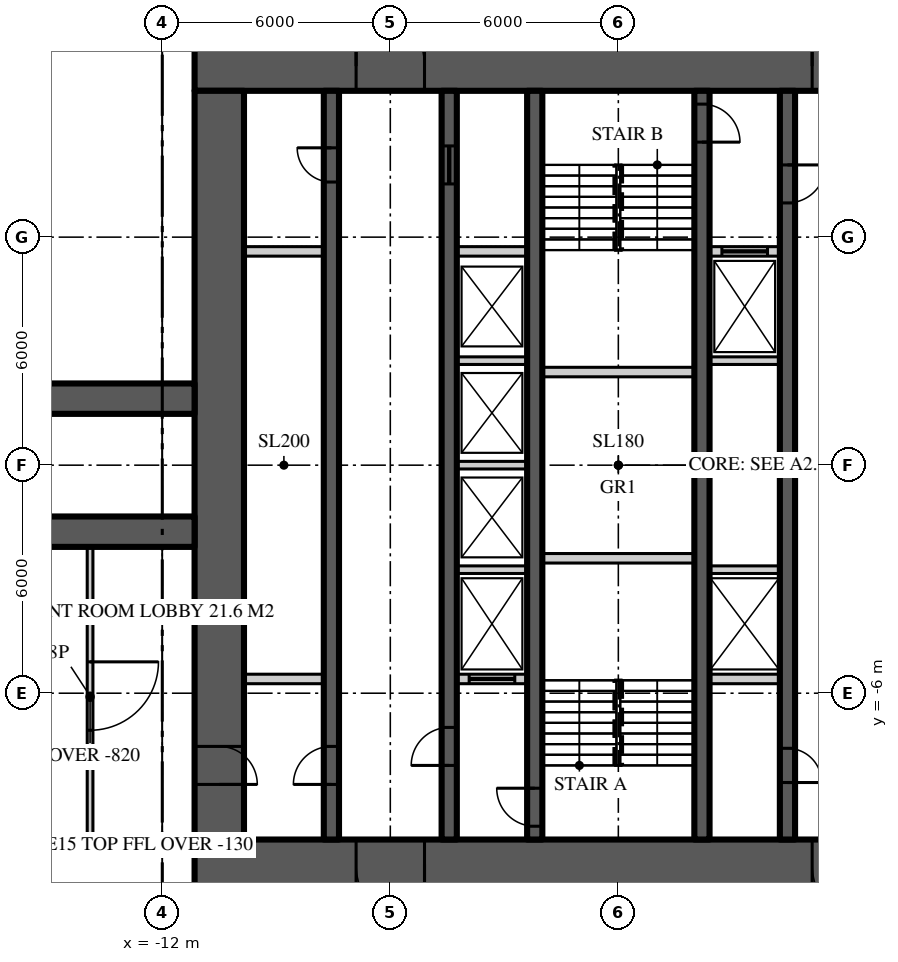
"""IFC4 building model, lengths in metres.
Left out: names, types, materials, properties, quantities, classifications, styles, units other than length and angle.
Written with IfcOpenShell. Run it as: python <this file> out.ifc"""

import sys

from ifc_helpers import new_model, si_unit, direction, frame, frame_2d, origin, place, context, subcontext, project, spatial, rectangle, extrude, element, fill, save


model = new_model("IFC4")
c1 = context("Model", 3, precision=1e-05, world=origin(), true_north=direction((0.0, 1.0)))
c2 = subcontext(c1, "Body", "Model", "MODEL_VIEW")
j1 = project(units=[si_unit("LENGTHUNIT", "METRE"), si_unit("PLANEANGLEUNIT", "RADIAN")], contexts=[c1])
p1 = place(None, origin())
s1 = spatial("IfcSite", under=j1, at=p1, CompositionType="ELEMENT")
p2 = place(p1, origin())
s2 = spatial("IfcBuilding", under=s1, at=p2, CompositionType="ELEMENT")
p3 = place(p2, frame((0.0, 0.0, 118.2)))
s3 = spatial("IfcBuildingStorey", under=s2, at=p3, CompositionType="ELEMENT", Elevation=118.2)
p4 = place(p3, frame((-11.15, 10.5, 0.0), z_axis=(0.0, 0.0, 1.0), x_axis=(1.0, 0.0, 0.0)))
e1 = element("IfcWall", 1, at=p4, inside=s3, PredefinedType="SHEAR", context=c2, shape_type="SweptSolid", body=[
    extrude(rectangle(XDim=22.3, YDim=1.3, at=frame_2d((11.15, 0.0))), origin(), (0.0, 0.0, 1.0), 6.0),
])
p5 = place(p4, frame((4.25, 0.0, 0.0)))
e2 = element("IfcOpeningElement", 2, at=p5, cuts=e1, PredefinedType="OPENING", context=c2, shape_type="SweptSolid", body=[
    extrude(rectangle(XDim=1.8, YDim=2.2, at=frame_2d((0.9, 1.1))), frame((0.0, 0.66, 0.0), z_axis=(0.0, -1.0, 0.0), x_axis=(1.0, 0.0, 0.0)), (0.0, 0.0, 1.0), 1.32),
])
p6 = place(p4, frame((16.25, 0.0, 0.0)))
e3 = element("IfcOpeningElement", 3, at=p6, cuts=e1, PredefinedType="OPENING", context=c2, shape_type="SweptSolid", body=[
    extrude(rectangle(XDim=1.8, YDim=2.2, at=frame_2d((0.9, 1.1))), frame((0.0, 0.66, 0.0), z_axis=(0.0, -1.0, 0.0), x_axis=(1.0, 0.0, 0.0)), (0.0, 0.0, 1.0), 1.32),
])
p7 = place(p3, frame((11.15, -10.5, 0.0), z_axis=(0.0, 0.0, 1.0), x_axis=(-1.0, 0.0, 0.0)))
e4 = element("IfcWall", 4, at=p7, inside=s3, PredefinedType="SHEAR", context=c2, shape_type="SweptSolid", body=[
    extrude(rectangle(XDim=22.3, YDim=1.3, at=frame_2d((11.15, 0.0))), origin(), (0.0, 0.0, 1.0), 6.0),
])
p8 = place(p7, frame((16.25, 0.0, 0.0)))
e5 = element("IfcOpeningElement", 5, at=p8, cuts=e4, PredefinedType="OPENING", context=c2, shape_type="SweptSolid", body=[
    extrude(rectangle(XDim=1.8, YDim=2.2, at=frame_2d((0.9, 1.1))), frame((0.0, 0.66, 0.0), z_axis=(0.0, -1.0, 0.0), x_axis=(1.0, 0.0, 0.0)), (0.0, 0.0, 1.0), 1.32),
])
p9 = place(p7, frame((4.25, 0.0, 0.0)))
e6 = element("IfcOpeningElement", 6, at=p9, cuts=e4, PredefinedType="OPENING", context=c2, shape_type="SweptSolid", body=[
    extrude(rectangle(XDim=1.8, YDim=2.2, at=frame_2d((0.9, 1.1))), frame((0.0, 0.66, 0.0), z_axis=(0.0, -1.0, 0.0), x_axis=(1.0, 0.0, 0.0)), (0.0, 0.0, 1.0), 1.32),
])
p10 = place(p3, frame((-10.5, 9.85, 0.0), z_axis=(0.0, 0.0, 1.0), x_axis=(0.0, -1.0, 0.0)))
e7 = element("IfcWall", 7, at=p10, inside=s3, PredefinedType="SHEAR", context=c2, shape_type="SweptSolid", body=[
    extrude(rectangle(XDim=19.7, YDim=1.3, at=frame_2d((9.85, 0.0))), origin(), (0.0, 0.0, 1.0), 6.0),
])
p11 = place(p10, frame((17.25, 0.0, 0.0)))
e8 = element("IfcOpeningElement", 8, at=p11, cuts=e7, PredefinedType="OPENING", context=c2, shape_type="SweptSolid", body=[
    extrude(rectangle(XDim=1.0, YDim=2.2, at=frame_2d((0.5, 1.1))), frame((0.0, 0.66, 0.0), z_axis=(0.0, -1.0, 0.0), x_axis=(1.0, 0.0, 0.0)), (0.0, 0.0, 1.0), 1.32),
])
for number, where, z_axis, x_axis in (
    (9, (-11.15, 1.75, 0.0), (0.0, 0.0, 1.0), (-1.0, 0.0, 0.0)),
    (10, (-11.15, -1.75, 0.0), (0.0, 0.0, 1.0), (-1.0, 0.0, 0.0)),
):
    element("IfcWall", number, at=place(p3, frame(where, z_axis=z_axis, x_axis=x_axis)), inside=s3, PredefinedType="SHEAR", context=c2, shape_type="SweptSolid", body=[
        extrude(rectangle(XDim=15.25, YDim=0.8, at=frame_2d((7.625, 0.0))), origin(), (0.0, 0.0, 1.0), 6.0),
    ])
p12 = place(p3, frame((-7.55, -9.85, 0.0), z_axis=(0.0, 0.0, 1.0), x_axis=(0.0, 1.0, 0.0)))
e11 = element("IfcWall", 11, at=p12, inside=s3, PredefinedType="SHEAR", context=c2, shape_type="SweptSolid", body=[
    extrude(rectangle(XDim=19.7, YDim=0.4, at=frame_2d((9.85, 0.0))), origin(), (0.0, 0.0, 1.0), 6.0),
])
p13 = place(p12, frame((1.45, 0.0, 0.0)))
e12 = element("IfcOpeningElement", 12, at=p13, cuts=e11, PredefinedType="OPENING", context=c2, shape_type="SweptSolid", body=[
    extrude(rectangle(XDim=1.0, YDim=2.2, at=frame_2d((0.5, 1.1))), frame((0.0, 0.21, 0.0), z_axis=(0.0, -1.0, 0.0), x_axis=(1.0, 0.0, 0.0)), (0.0, 0.0, 1.0), 0.42),
])
p14 = place(p12, frame((17.3, 0.0, 0.0)))
e13 = element("IfcOpeningElement", 13, at=p14, cuts=e11, PredefinedType="OPENING", context=c2, shape_type="SweptSolid", body=[
    extrude(rectangle(XDim=0.9, YDim=2.1, at=frame_2d((0.45, 1.05))), frame((0.0, 0.21, 0.0), z_axis=(0.0, -1.0, 0.0), x_axis=(1.0, 0.0, 0.0)), (0.0, 0.0, 1.0), 0.42),
])
p15 = place(p3, frame((-4.45, -9.85, 0.0), z_axis=(0.0, 0.0, 1.0), x_axis=(0.0, 1.0, 0.0)))
e14 = element("IfcWall", 14, at=p15, inside=s3, PredefinedType="SHEAR", context=c2, shape_type="SweptSolid", body=[
    extrude(rectangle(XDim=19.7, YDim=0.4, at=frame_2d((9.85, 0.0))), origin(), (0.0, 0.0, 1.0), 6.0),
])
p16 = place(p15, frame((1.95, 0.0, 0.0)))
e15 = element("IfcOpeningElement", 15, at=p16, cuts=e14, PredefinedType="OPENING", context=c2, shape_type="SweptSolid", body=[
    extrude(rectangle(XDim=1.0, YDim=2.2, at=frame_2d((0.5, 1.1))), frame((0.0, 0.21, 0.0), z_axis=(0.0, -1.0, 0.0), x_axis=(1.0, 0.0, 0.0)), (0.0, 0.0, 1.0), 0.42),
])
p17 = place(p15, frame((17.25, 0.0, 0.0)))
e16 = element("IfcOpeningElement", 16, at=p17, cuts=e14, PredefinedType="OPENING", context=c2, shape_type="SweptSolid", body=[
    extrude(rectangle(XDim=1.0, YDim=2.1, at=frame_2d((0.5, 1.05))), frame((0.0, 0.21, 0.0), z_axis=(0.0, -1.0, 0.0), x_axis=(1.0, 0.0, 0.0)), (0.0, 0.0, 1.0), 0.42),
])
p18 = place(p3, frame((4.45, 9.85, 0.0), z_axis=(0.0, 0.0, 1.0), x_axis=(0.0, -1.0, 0.0)))
e17 = element("IfcWall", 17, at=p18, inside=s3, PredefinedType="SHEAR", context=c2, shape_type="SweptSolid", body=[
    extrude(rectangle(XDim=19.7, YDim=0.4, at=frame_2d((9.85, 0.0))), origin(), (0.0, 0.0, 1.0), 6.0),
])
p19 = place(p18, frame((1.95, 0.0, 0.0)))
e18 = element("IfcOpeningElement", 18, at=p19, cuts=e17, PredefinedType="OPENING", context=c2, shape_type="SweptSolid", body=[
    extrude(rectangle(XDim=1.0, YDim=2.2, at=frame_2d((0.5, 1.1))), frame((0.0, 0.21, 0.0), z_axis=(0.0, -1.0, 0.0), x_axis=(1.0, 0.0, 0.0)), (0.0, 0.0, 1.0), 0.42),
])
p20 = place(p18, frame((17.3, 0.0, 0.0)))
e19 = element("IfcOpeningElement", 19, at=p20, cuts=e17, PredefinedType="OPENING", context=c2, shape_type="SweptSolid", body=[
    extrude(rectangle(XDim=0.9, YDim=2.1, at=frame_2d((0.45, 1.05))), frame((0.0, 0.21, 0.0), z_axis=(0.0, -1.0, 0.0), x_axis=(1.0, 0.0, 0.0)), (0.0, 0.0, 1.0), 0.42),
])
p21 = place(p3, frame((-2.2, -9.85, 0.0), z_axis=(0.0, 0.0, 1.0), x_axis=(0.0, 1.0, 0.0)))
e20 = element("IfcWall", 20, at=p21, inside=s3, PredefinedType="SHEAR", context=c2, shape_type="SweptSolid", body=[
    extrude(rectangle(XDim=19.7, YDim=0.4, at=frame_2d((9.85, 0.0))), origin(), (0.0, 0.0, 1.0), 6.0),
])
p22 = place(p21, frame((0.35, 0.0, 0.0)))
e21 = element("IfcOpeningElement", 21, at=p22, cuts=e20, PredefinedType="OPENING", context=c2, shape_type="SweptSolid", body=[
    extrude(rectangle(XDim=1.0, YDim=2.2, at=frame_2d((0.5, 1.1))), frame((0.0, 0.21, 0.0), z_axis=(0.0, -1.0, 0.0), x_axis=(1.0, 0.0, 0.0)), (0.0, 0.0, 1.0), 0.42),
])
p23 = place(p3, frame((2.2, 9.85, 0.0), z_axis=(0.0, 0.0, 1.0), x_axis=(0.0, -1.0, 0.0)))
e22 = element("IfcWall", 22, at=p23, inside=s3, PredefinedType="SHEAR", context=c2, shape_type="SweptSolid", body=[
    extrude(rectangle(XDim=19.7, YDim=0.4, at=frame_2d((9.85, 0.0))), origin(), (0.0, 0.0, 1.0), 6.0),
])
p24 = place(p23, frame((0.35, 0.0, 0.0)))
e23 = element("IfcOpeningElement", 23, at=p24, cuts=e22, PredefinedType="OPENING", context=c2, shape_type="SweptSolid", body=[
    extrude(rectangle(XDim=1.0, YDim=2.2, at=frame_2d((0.5, 1.1))), frame((0.0, 0.21, 0.0), z_axis=(0.0, -1.0, 0.0), x_axis=(1.0, 0.0, 0.0)), (0.0, 0.0, 1.0), 0.42),
])
p25 = place(p3, frame((-9.85, 5.625, 0.0), z_axis=(0.0, 0.0, 1.0), x_axis=(1.0, 0.0, 0.0)))
e24 = element("IfcWall", 24, at=p25, inside=s3, PredefinedType="SOLIDWALL", context=c2, shape_type="SweptSolid", body=[
    extrude(rectangle(XDim=2.1, YDim=0.25, at=frame_2d((1.05, 0.0))), origin(), (0.0, 0.0, 1.0), 5.8),
])
p26 = place(p3, frame((-4.25, 5.625, 0.0), z_axis=(0.0, 0.0, 1.0), x_axis=(1.0, 0.0, 0.0)))
e25 = element("IfcWall", 25, at=p26, inside=s3, PredefinedType="SOLIDWALL", context=c2, shape_type="SweptSolid", body=[
    extrude(rectangle(XDim=1.85, YDim=0.25, at=frame_2d((0.925, 0.0))), origin(), (0.0, 0.0, 1.0), 5.8),
])
p27 = place(p3, frame((2.4, 5.625, 0.0), z_axis=(0.0, 0.0, 1.0), x_axis=(1.0, 0.0, 0.0)))
e26 = element("IfcWall", 26, at=p27, inside=s3, PredefinedType="SOLIDWALL", context=c2, shape_type="SweptSolid", body=[
    extrude(rectangle(XDim=1.85, YDim=0.25, at=frame_2d((0.925, 0.0))), origin(), (0.0, 0.0, 1.0), 5.8),
])
p28 = place(p27, frame((0.325, 0.0, 0.0)))
e27 = element("IfcOpeningElement", 27, at=p28, cuts=e26, PredefinedType="OPENING", context=c2, shape_type="SweptSolid", body=[
    extrude(rectangle(XDim=1.2, YDim=2.2, at=frame_2d((0.6, 1.1))), frame((0.0, 0.135, 0.0), z_axis=(0.0, -1.0, 0.0), x_axis=(1.0, 0.0, 0.0)), (0.0, 0.0, 1.0), 0.27),
])
p29 = place(p3, frame((-9.85, -5.625, 0.0), z_axis=(0.0, 0.0, 1.0), x_axis=(1.0, 0.0, 0.0)))
e28 = element("IfcWall", 28, at=p29, inside=s3, PredefinedType="SOLIDWALL", context=c2, shape_type="SweptSolid", body=[
    extrude(rectangle(XDim=2.1, YDim=0.25, at=frame_2d((1.05, 0.0))), origin(), (0.0, 0.0, 1.0), 5.8),
])
p30 = place(p3, frame((-4.25, -5.625, 0.0), z_axis=(0.0, 0.0, 1.0), x_axis=(1.0, 0.0, 0.0)))
e29 = element("IfcWall", 29, at=p30, inside=s3, PredefinedType="SOLIDWALL", context=c2, shape_type="SweptSolid", body=[
    extrude(rectangle(XDim=1.85, YDim=0.25, at=frame_2d((0.925, 0.0))), origin(), (0.0, 0.0, 1.0), 5.8),
])
p31 = place(p30, frame((0.325, 0.0, 0.0)))
e30 = element("IfcOpeningElement", 30, at=p31, cuts=e29, PredefinedType="OPENING", context=c2, shape_type="SweptSolid", body=[
    extrude(rectangle(XDim=1.2, YDim=2.2, at=frame_2d((0.6, 1.1))), frame((0.0, 0.135, 0.0), z_axis=(0.0, -1.0, 0.0), x_axis=(1.0, 0.0, 0.0)), (0.0, 0.0, 1.0), 0.27),
])
p32 = place(p3, frame((2.4, -5.625, 0.0), z_axis=(0.0, 0.0, 1.0), x_axis=(1.0, 0.0, 0.0)))
e31 = element("IfcWall", 31, at=p32, inside=s3, PredefinedType="SOLIDWALL", context=c2, shape_type="SweptSolid", body=[
    extrude(rectangle(XDim=1.85, YDim=0.25, at=frame_2d((0.925, 0.0))), origin(), (0.0, 0.0, 1.0), 5.8),
])
for number, where, z_axis, x_axis in (
    (32, (-2.0, -2.45, 0.0), (0.0, 0.0, 1.0), (1.0, 0.0, 0.0)),
    (33, (-2.0, 2.45, 0.0), (0.0, 0.0, 1.0), (1.0, 0.0, 0.0)),
):
    element("IfcWall", number, at=place(p3, frame(where, z_axis=z_axis, x_axis=x_axis)), inside=s3, PredefinedType="SOLIDWALL", context=c2, shape_type="SweptSolid", body=[
        extrude(rectangle(XDim=4.0, YDim=0.25, at=frame_2d((2.0, 0.0))), origin(), (0.0, 0.0, 1.0), 5.8),
    ])
for number, where, z_axis, x_axis in (
    (34, (-4.25, -2.75, 0.0), (0.0, 0.0, 1.0), (1.0, 0.0, 0.0)),
    (35, (2.4, -2.75, 0.0), (0.0, 0.0, 1.0), (1.0, 0.0, 0.0)),
    (36, (-4.25, 0.0, 0.0), (0.0, 0.0, 1.0), (1.0, 0.0, 0.0)),
    (37, (-4.25, 2.75, 0.0), (0.0, 0.0, 1.0), (1.0, 0.0, 0.0)),
    (38, (2.4, 2.75, 0.0), (0.0, 0.0, 1.0), (1.0, 0.0, 0.0)),
):
    element("IfcWall", number, at=place(p3, frame(where, z_axis=z_axis, x_axis=x_axis)), inside=s3, PredefinedType="SOLIDWALL", context=c2, shape_type="SweptSolid", body=[
        extrude(rectangle(XDim=1.85, YDim=0.2, at=frame_2d((0.925, 0.0))), origin(), (0.0, 0.0, 1.0), 5.8),
    ])
p33 = place(p3, frame((-13.9, -2.15, 0.0), z_axis=(0.0, 0.0, 1.0), x_axis=(0.0, -1.0, 0.0)))
e39 = element("IfcWall", 39, at=p33, inside=s3, PredefinedType="SOLIDWALL", context=c2, shape_type="SweptSolid", body=[
    extrude(rectangle(XDim=7.925, YDim=0.15, at=frame_2d((3.962, 0.0))), origin(), (0.0, 0.0, 1.0), 5.18),
])
p34 = place(p33, frame((3.025, 0.0, 0.0)))
e40 = element("IfcOpeningElement", 40, at=p34, cuts=e39, PredefinedType="OPENING", context=c2, shape_type="SweptSolid", body=[
    extrude(rectangle(XDim=1.8, YDim=2.4, at=frame_2d((0.9, 1.2))), frame((0.0, 0.085, 0.0), z_axis=(0.0, -1.0, 0.0), x_axis=(1.0, 0.0, 0.0)), (0.0, 0.0, 1.0), 0.17),
])
p35 = place(p3, frame((-11.15, -10.0, 0.0), z_axis=(0.0, 0.0, 1.0), x_axis=(-1.0, 0.0, 0.0)))
e41 = element("IfcWall", 41, at=p35, inside=s3, PredefinedType="SOLIDWALL", context=c2, shape_type="SweptSolid", body=[
    extrude(rectangle(XDim=2.675, YDim=0.15, at=frame_2d((1.337, 0.0))), origin(), (0.0, 0.0, 1.0), 5.87),
])
p36 = place(p5, origin())
e42 = element("IfcDoor", 42, at=p36, inside=s3, OperationType="DOUBLE_DOOR_DOUBLE_SWING", PredefinedType="DOOR", context=c2, shape_type="SweptSolid", body=[
    extrude(rectangle(XDim=1.8, YDim=2.2, at=frame_2d((0.9, 1.1))), frame((0.0, 0.025, 0.0), z_axis=(0.0, -1.0, 0.0), x_axis=(1.0, 0.0, 0.0)), (0.0, 0.0, 1.0), 0.05),
])
fill(e2, e42)
p37 = place(p8, origin())
e43 = element("IfcDoor", 43, at=p37, inside=s3, OperationType="DOUBLE_DOOR_DOUBLE_SWING", PredefinedType="DOOR", context=c2, shape_type="SweptSolid", body=[
    extrude(rectangle(XDim=1.8, YDim=2.2, at=frame_2d((0.9, 1.1))), frame((0.0, 0.025, 0.0), z_axis=(0.0, -1.0, 0.0), x_axis=(1.0, 0.0, 0.0)), (0.0, 0.0, 1.0), 0.05),
])
fill(e5, e43)
p38 = place(p6, origin())
e44 = element("IfcDoor", 44, at=p38, inside=s3, OperationType="DOUBLE_DOOR_DOUBLE_SWING", PredefinedType="DOOR", context=c2, shape_type="SweptSolid", body=[
    extrude(rectangle(XDim=1.8, YDim=2.2, at=frame_2d((0.9, 1.1))), frame((0.0, 0.025, 0.0), z_axis=(0.0, -1.0, 0.0), x_axis=(1.0, 0.0, 0.0)), (0.0, 0.0, 1.0), 0.05),
])
fill(e3, e44)
p39 = place(p9, origin())
e45 = element("IfcDoor", 45, at=p39, inside=s3, OperationType="DOUBLE_DOOR_DOUBLE_SWING", PredefinedType="DOOR", context=c2, shape_type="SweptSolid", body=[
    extrude(rectangle(XDim=1.8, YDim=2.2, at=frame_2d((0.9, 1.1))), frame((0.0, 0.025, 0.0), z_axis=(0.0, -1.0, 0.0), x_axis=(1.0, 0.0, 0.0)), (0.0, 0.0, 1.0), 0.05),
])
fill(e6, e45)
p40 = place(p13, origin())
e46 = element("IfcDoor", 46, at=p40, inside=s3, OperationType="SINGLE_SWING_LEFT", PredefinedType="DOOR", context=c2, shape_type="SweptSolid", body=[
    extrude(rectangle(XDim=1.0, YDim=2.2, at=frame_2d((0.5, 1.1))), frame((0.0, 0.025, 0.0), z_axis=(0.0, -1.0, 0.0), x_axis=(1.0, 0.0, 0.0)), (0.0, 0.0, 1.0), 0.05),
])
fill(e12, e46)
p41 = place(p11, origin())
e47 = element("IfcDoor", 47, at=p41, inside=s3, OperationType="SINGLE_SWING_RIGHT", PredefinedType="DOOR", context=c2, shape_type="SweptSolid", body=[
    extrude(rectangle(XDim=1.0, YDim=2.2, at=frame_2d((0.5, 1.1))), frame((0.0, 0.025, 0.0), z_axis=(0.0, -1.0, 0.0), x_axis=(1.0, 0.0, 0.0)), (0.0, 0.0, 1.0), 0.05),
])
fill(e8, e47)
p42 = place(p16, origin())
e48 = element("IfcDoor", 48, at=p42, inside=s3, OperationType="SINGLE_SWING_LEFT", PredefinedType="DOOR", context=c2, shape_type="SweptSolid", body=[
    extrude(rectangle(XDim=1.0, YDim=2.2, at=frame_2d((0.5, 1.1))), frame((0.0, 0.025, 0.0), z_axis=(0.0, -1.0, 0.0), x_axis=(1.0, 0.0, 0.0)), (0.0, 0.0, 1.0), 0.05),
])
fill(e15, e48)
p43 = place(p22, origin())
e49 = element("IfcDoor", 49, at=p43, inside=s3, OperationType="SINGLE_SWING_RIGHT", PredefinedType="DOOR", context=c2, shape_type="SweptSolid", body=[
    extrude(rectangle(XDim=1.0, YDim=2.2, at=frame_2d((0.5, 1.1))), frame((0.0, 0.025, 0.0), z_axis=(0.0, -1.0, 0.0), x_axis=(1.0, 0.0, 0.0)), (0.0, 0.0, 1.0), 0.05),
])
fill(e21, e49)
p44 = place(p19, origin())
e50 = element("IfcDoor", 50, at=p44, inside=s3, OperationType="SINGLE_SWING_LEFT", PredefinedType="DOOR", context=c2, shape_type="SweptSolid", body=[
    extrude(rectangle(XDim=1.0, YDim=2.2, at=frame_2d((0.5, 1.1))), frame((0.0, 0.025, 0.0), z_axis=(0.0, -1.0, 0.0), x_axis=(1.0, 0.0, 0.0)), (0.0, 0.0, 1.0), 0.05),
])
fill(e18, e50)
p45 = place(p24, origin())
e51 = element("IfcDoor", 51, at=p45, inside=s3, OperationType="SINGLE_SWING_RIGHT", PredefinedType="DOOR", context=c2, shape_type="SweptSolid", body=[
    extrude(rectangle(XDim=1.0, YDim=2.2, at=frame_2d((0.5, 1.1))), frame((0.0, 0.025, 0.0), z_axis=(0.0, -1.0, 0.0), x_axis=(1.0, 0.0, 0.0)), (0.0, 0.0, 1.0), 0.05),
])
fill(e23, e51)
p46 = place(p14, origin())
e52 = element("IfcDoor", 52, at=p46, inside=s3, OperationType="SINGLE_SWING_RIGHT", PredefinedType="DOOR", context=c2, shape_type="SweptSolid", body=[
    extrude(rectangle(XDim=0.9, YDim=2.1, at=frame_2d((0.45, 1.05))), frame((0.0, 0.025, 0.0), z_axis=(0.0, -1.0, 0.0), x_axis=(1.0, 0.0, 0.0)), (0.0, 0.0, 1.0), 0.05),
])
fill(e13, e52)
p47 = place(p17, origin())
e53 = element("IfcDoor", 53, at=p47, inside=s3, OperationType="SLIDING_TO_LEFT", PredefinedType="DOOR", context=c2, shape_type="SweptSolid", body=[
    extrude(rectangle(XDim=1.0, YDim=2.1, at=frame_2d((0.5, 1.05))), frame((0.0, 0.025, 0.0), z_axis=(0.0, -1.0, 0.0), x_axis=(1.0, 0.0, 0.0)), (0.0, 0.0, 1.0), 0.05),
])
fill(e16, e53)
p48 = place(p20, origin())
e54 = element("IfcDoor", 54, at=p48, inside=s3, OperationType="SINGLE_SWING_RIGHT", PredefinedType="DOOR", context=c2, shape_type="SweptSolid", body=[
    extrude(rectangle(XDim=0.9, YDim=2.1, at=frame_2d((0.45, 1.05))), frame((0.0, 0.025, 0.0), z_axis=(0.0, -1.0, 0.0), x_axis=(1.0, 0.0, 0.0)), (0.0, 0.0, 1.0), 0.05),
])
fill(e19, e54)
p49 = place(p31, origin())
e55 = element("IfcDoor", 55, at=p49, inside=s3, OperationType="SLIDING_TO_LEFT", PredefinedType="DOOR", context=c2, shape_type="SweptSolid", body=[
    extrude(rectangle(XDim=1.2, YDim=2.2, at=frame_2d((0.6, 1.1))), frame((0.0, 0.025, 0.0), z_axis=(0.0, -1.0, 0.0), x_axis=(1.0, 0.0, 0.0)), (0.0, 0.0, 1.0), 0.05),
])
fill(e30, e55)
p50 = place(p28, origin())
e56 = element("IfcDoor", 56, at=p50, inside=s3, OperationType="SLIDING_TO_LEFT", PredefinedType="DOOR", context=c2, shape_type="SweptSolid", body=[
    extrude(rectangle(XDim=1.2, YDim=2.2, at=frame_2d((0.6, 1.1))), frame((0.0, 0.025, 0.0), z_axis=(0.0, -1.0, 0.0), x_axis=(1.0, 0.0, 0.0)), (0.0, 0.0, 1.0), 0.05),
])
fill(e27, e56)
p51 = place(p34, origin())
e57 = element("IfcDoor", 57, at=p51, inside=s3, OperationType="DOUBLE_DOOR_DOUBLE_SWING", PredefinedType="DOOR", context=c2, shape_type="SweptSolid", body=[
    extrude(rectangle(XDim=1.8, YDim=2.4, at=frame_2d((0.9, 1.2))), frame((0.0, 0.025, 0.0), z_axis=(0.0, -1.0, 0.0), x_axis=(1.0, 0.0, 0.0)), (0.0, 0.0, 1.0), 0.05),
])
fill(e40, e57)
save(model, sys.argv[1])
